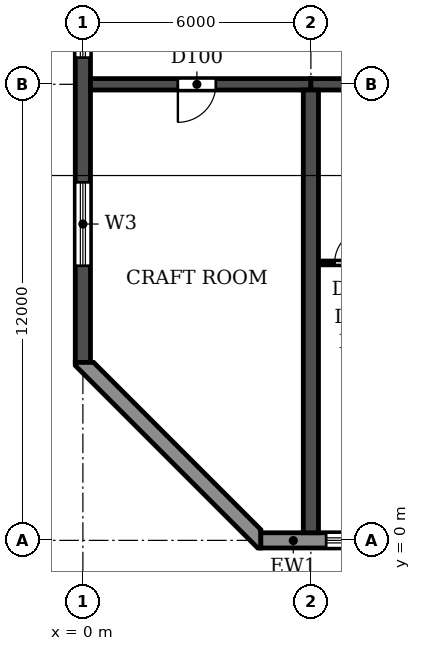
"""IFC4 building model, lengths in metres.
Left out: names, types, materials, properties, quantities, classifications, styles, units other than length and angle.
Written with IfcOpenShell. Run it as: python <this file> out.ifc"""

import sys

from ifc_helpers import new_model, si_unit, direction, frame, frame_2d, origin, place, context, subcontext, project, spatial, polyline, rectangle, outline, extrude, element, fill, save


model = new_model("IFC4")
c1 = context("Model", 3, precision=1e-05, world=origin(), true_north=direction((0.0, 1.0)))
c2 = subcontext(c1, "Body", "Model", "MODEL_VIEW")
j1 = project(units=[si_unit("LENGTHUNIT", "METRE"), si_unit("PLANEANGLEUNIT", "RADIAN")], contexts=[c1])
p1 = place(None, origin())
s1 = spatial("IfcSite", under=j1, at=p1, CompositionType="ELEMENT")
p2 = place(p1, origin())
s2 = spatial("IfcBuilding", under=s1, at=p2, CompositionType="ELEMENT")
p3 = place(p2, frame((0.0, 0.0, 43.2)))
s3 = spatial("IfcBuildingStorey", under=s2, at=p3, CompositionType="ELEMENT", Elevation=43.2)
p4 = place(p3, frame((6.0, 0.2, 0.0), z_axis=(0.0, 0.0, 1.0), x_axis=(0.0, 1.0, 0.0)))
e1 = element("IfcWall", 1, at=p4, inside=s3, PredefinedType="SHEAR", context=c2, shape_type="SweptSolid", body=[
    extrude(rectangle(XDim=11.65, YDim=0.4, at=frame_2d((5.825, 0.0))), origin(), (0.0, 0.0, 1.0), 3.05),
])
p5 = place(p3, frame((0.0, 4.683, 0.0), z_axis=(0.0, 0.0, 1.0), x_axis=(0.0, 1.0, 0.0)))
e2 = element("IfcWall", 2, at=p5, inside=s3, PredefinedType="SHEAR", context=c2, shape_type="SweptSolid", body=[
    extrude(rectangle(XDim=35.434, YDim=0.4, at=frame_2d((17.717, 0.0))), origin(), (0.0, 0.0, 1.0), 3.05),
])
p6 = place(p5, frame((23.817, 0.0, 0.9)))
e3 = element("IfcOpeningElement", 3, at=p6, cuts=e2, PredefinedType="OPENING", context=c2, shape_type="SweptSolid", body=[
    extrude(rectangle(XDim=1.2, YDim=1.5, at=frame_2d((0.6, 0.75))), frame((0.0, 0.21, 0.0), z_axis=(0.0, -1.0, 0.0), x_axis=(1.0, 0.0, 0.0)), (0.0, 0.0, 1.0), 0.42),
])
p7 = place(p5, frame((8.017, 0.0, 0.9)))
e4 = element("IfcOpeningElement", 4, at=p7, cuts=e2, PredefinedType="OPENING", context=c2, shape_type="SweptSolid", body=[
    extrude(rectangle(XDim=1.2, YDim=1.5, at=frame_2d((0.6, 0.75))), frame((0.0, 0.21, 0.0), z_axis=(0.0, -1.0, 0.0), x_axis=(1.0, 0.0, 0.0)), (0.0, 0.0, 1.0), 0.42),
])
p8 = place(p5, frame((15.917, 0.0, 0.9)))
e5 = element("IfcOpeningElement", 5, at=p8, cuts=e2, PredefinedType="OPENING", context=c2, shape_type="SweptSolid", body=[
    extrude(rectangle(XDim=1.2, YDim=1.5, at=frame_2d((0.6, 0.75))), frame((0.0, 0.21, 0.0), z_axis=(0.0, -1.0, 0.0), x_axis=(1.0, 0.0, 0.0)), (0.0, 0.0, 1.0), 0.42),
])
p9 = place(p5, frame((29.493, 0.0, 0.6)))
e6 = element("IfcOpeningElement", 6, at=p9, cuts=e2, PredefinedType="OPENING", context=c2, shape_type="SweptSolid", body=[
    extrude(rectangle(XDim=2.2, YDim=1.8, at=frame_2d((1.1, 0.9))), frame((0.0, 0.21, 0.0), z_axis=(0.0, -1.0, 0.0), x_axis=(1.0, 0.0, 0.0)), (0.0, 0.0, 1.0), 0.42),
])
p10 = place(p5, frame((2.541, 0.0, 0.6)))
e7 = element("IfcOpeningElement", 7, at=p10, cuts=e2, PredefinedType="OPENING", context=c2, shape_type="SweptSolid", body=[
    extrude(rectangle(XDim=2.2, YDim=1.8, at=frame_2d((1.1, 0.9))), frame((0.0, 0.21, 0.0), z_axis=(0.0, -1.0, 0.0), x_axis=(1.0, 0.0, 0.0)), (0.0, 0.0, 1.0), 0.42),
])
p11 = place(p3, frame((0.2, 12.0, 0.0), z_axis=(0.0, 0.0, 1.0), x_axis=(1.0, 0.0, 0.0)))
e8 = element("IfcWall", 8, at=p11, inside=s3, PredefinedType="SHEAR", context=c2, shape_type="SweptSolid", body=[
    extrude(rectangle(XDim=5.8, YDim=0.3, at=frame_2d((2.9, 0.0))), origin(), (0.0, 0.0, 1.0), 2.45),
])
p12 = place(p11, frame((2.3, 0.0, 0.0)))
e9 = element("IfcOpeningElement", 9, at=p12, cuts=e8, PredefinedType="OPENING", context=c2, shape_type="SweptSolid", body=[
    extrude(rectangle(XDim=1.0, YDim=2.1, at=frame_2d((0.5, 1.05))), frame((0.0, 0.16, 0.0), z_axis=(0.0, -1.0, 0.0), x_axis=(1.0, 0.0, 0.0)), (0.0, 0.0, 1.0), 0.32),
])
p13 = place(p3, frame((6.0, 12.0, 0.0), z_axis=(0.0, 0.0, 1.0), x_axis=(1.0, 0.0, 0.0)))
e10 = element("IfcWall", 10, at=p13, inside=s3, PredefinedType="SHEAR", context=c2, shape_type="SweptSolid", body=[
    extrude(rectangle(XDim=6.0, YDim=0.3, at=frame_2d((3.0, 0.0))), origin(), (0.0, 0.0, 1.0), 2.45),
])
p14 = place(p13, frame((2.55, 0.0, 0.0)))
e11 = element("IfcOpeningElement", 11, at=p14, cuts=e10, PredefinedType="OPENING", context=c2, shape_type="SweptSolid", body=[
    extrude(rectangle(XDim=1.0, YDim=2.1, at=frame_2d((0.5, 1.05))), frame((0.0, 0.16, 0.0), z_axis=(0.0, -1.0, 0.0), x_axis=(1.0, 0.0, 0.0)), (0.0, 0.0, 1.0), 0.32),
])
p15 = place(p3, frame((4.683, 0.0, 0.0), z_axis=(0.0, 0.0, 1.0), x_axis=(1.0, 0.0, 0.0)))
e12 = element("IfcWall", 12, at=p15, inside=s3, PredefinedType="STANDARD", context=c2, shape_type="SweptSolid", body=[
    extrude(rectangle(XDim=92.634, YDim=0.4, at=frame_2d((46.317, 0.0))), origin(), (0.0, 0.0, 1.0), 3.05),
])
p16 = place(p15, frame((1.717, 0.0, 0.9)))
e13 = element("IfcOpeningElement", 13, at=p16, cuts=e12, PredefinedType="OPENING", context=c2, shape_type="SweptSolid", body=[
    extrude(rectangle(XDim=2.2, YDim=1.5, at=frame_2d((1.1, 0.75))), frame((0.0, 0.21, 0.0), z_axis=(0.0, -1.0, 0.0), x_axis=(1.0, 0.0, 0.0)), (0.0, 0.0, 1.0), 0.42),
])
p17 = place(p15, frame((4.717, 0.0, 0.9)))
e14 = element("IfcOpeningElement", 14, at=p17, cuts=e12, PredefinedType="OPENING", context=c2, shape_type="SweptSolid", body=[
    extrude(rectangle(XDim=2.2, YDim=1.5, at=frame_2d((1.1, 0.75))), frame((0.0, 0.21, 0.0), z_axis=(0.0, -1.0, 0.0), x_axis=(1.0, 0.0, 0.0)), (0.0, 0.0, 1.0), 0.42),
])
p18 = place(p15, frame((7.717, 0.0, 0.9)))
e15 = element("IfcOpeningElement", 15, at=p18, cuts=e12, PredefinedType="OPENING", context=c2, shape_type="SweptSolid", body=[
    extrude(rectangle(XDim=2.2, YDim=1.5, at=frame_2d((1.1, 0.75))), frame((0.0, 0.21, 0.0), z_axis=(0.0, -1.0, 0.0), x_axis=(1.0, 0.0, 0.0)), (0.0, 0.0, 1.0), 0.42),
])
p19 = place(p15, frame((10.917, 0.0, 0.0)))
e16 = element("IfcOpeningElement", 16, at=p19, cuts=e12, PredefinedType="OPENING", context=c2, shape_type="SweptSolid", body=[
    extrude(rectangle(XDim=1.8, YDim=2.4, at=frame_2d((0.9, 1.2))), frame((0.0, 0.21, 0.0), z_axis=(0.0, -1.0, 0.0), x_axis=(1.0, 0.0, 0.0)), (0.0, 0.0, 1.0), 0.42),
])
p20 = place(p15, frame((13.717, 0.0, 0.9)))
e17 = element("IfcOpeningElement", 17, at=p20, cuts=e12, PredefinedType="OPENING", context=c2, shape_type="SweptSolid", body=[
    extrude(rectangle(XDim=2.2, YDim=1.5, at=frame_2d((1.1, 0.75))), frame((0.0, 0.21, 0.0), z_axis=(0.0, -1.0, 0.0), x_axis=(1.0, 0.0, 0.0)), (0.0, 0.0, 1.0), 0.42),
])
p21 = place(p15, frame((16.717, 0.0, 0.9)))
e18 = element("IfcOpeningElement", 18, at=p21, cuts=e12, PredefinedType="OPENING", context=c2, shape_type="SweptSolid", body=[
    extrude(rectangle(XDim=2.2, YDim=1.5, at=frame_2d((1.1, 0.75))), frame((0.0, 0.21, 0.0), z_axis=(0.0, -1.0, 0.0), x_axis=(1.0, 0.0, 0.0)), (0.0, 0.0, 1.0), 0.42),
])
p22 = place(p15, frame((19.917, 0.0, 0.0)))
e19 = element("IfcOpeningElement", 19, at=p22, cuts=e12, PredefinedType="OPENING", context=c2, shape_type="SweptSolid", body=[
    extrude(rectangle(XDim=1.8, YDim=2.4, at=frame_2d((0.9, 1.2))), frame((0.0, 0.21, 0.0), z_axis=(0.0, -1.0, 0.0), x_axis=(1.0, 0.0, 0.0)), (0.0, 0.0, 1.0), 0.42),
])
p23 = place(p15, frame((22.717, 0.0, 0.9)))
e20 = element("IfcOpeningElement", 20, at=p23, cuts=e12, PredefinedType="OPENING", context=c2, shape_type="SweptSolid", body=[
    extrude(rectangle(XDim=2.2, YDim=1.5, at=frame_2d((1.1, 0.75))), frame((0.0, 0.21, 0.0), z_axis=(0.0, -1.0, 0.0), x_axis=(1.0, 0.0, 0.0)), (0.0, 0.0, 1.0), 0.42),
])
p24 = place(p15, frame((25.717, 0.0, 0.9)))
e21 = element("IfcOpeningElement", 21, at=p24, cuts=e12, PredefinedType="OPENING", context=c2, shape_type="SweptSolid", body=[
    extrude(rectangle(XDim=2.2, YDim=1.5, at=frame_2d((1.1, 0.75))), frame((0.0, 0.21, 0.0), z_axis=(0.0, -1.0, 0.0), x_axis=(1.0, 0.0, 0.0)), (0.0, 0.0, 1.0), 0.42),
])
p25 = place(p15, frame((28.717, 0.0, 0.9)))
e22 = element("IfcOpeningElement", 22, at=p25, cuts=e12, PredefinedType="OPENING", context=c2, shape_type="SweptSolid", body=[
    extrude(rectangle(XDim=2.2, YDim=1.5, at=frame_2d((1.1, 0.75))), frame((0.0, 0.21, 0.0), z_axis=(0.0, -1.0, 0.0), x_axis=(1.0, 0.0, 0.0)), (0.0, 0.0, 1.0), 0.42),
])
p26 = place(p15, frame((31.717, 0.0, 0.9)))
e23 = element("IfcOpeningElement", 23, at=p26, cuts=e12, PredefinedType="OPENING", context=c2, shape_type="SweptSolid", body=[
    extrude(rectangle(XDim=2.2, YDim=1.5, at=frame_2d((1.1, 0.75))), frame((0.0, 0.21, 0.0), z_axis=(0.0, -1.0, 0.0), x_axis=(1.0, 0.0, 0.0)), (0.0, 0.0, 1.0), 0.42),
])
p27 = place(p15, frame((34.917, 0.0, 0.0)))
e24 = element("IfcOpeningElement", 24, at=p27, cuts=e12, PredefinedType="OPENING", context=c2, shape_type="SweptSolid", body=[
    extrude(rectangle(XDim=1.8, YDim=2.4, at=frame_2d((0.9, 1.2))), frame((0.0, 0.21, 0.0), z_axis=(0.0, -1.0, 0.0), x_axis=(1.0, 0.0, 0.0)), (0.0, 0.0, 1.0), 0.42),
])
p28 = place(p15, frame((37.717, 0.0, 0.9)))
e25 = element("IfcOpeningElement", 25, at=p28, cuts=e12, PredefinedType="OPENING", context=c2, shape_type="SweptSolid", body=[
    extrude(rectangle(XDim=2.2, YDim=1.5, at=frame_2d((1.1, 0.75))), frame((0.0, 0.21, 0.0), z_axis=(0.0, -1.0, 0.0), x_axis=(1.0, 0.0, 0.0)), (0.0, 0.0, 1.0), 0.42),
])
p29 = place(p15, frame((40.717, 0.0, 0.9)))
e26 = element("IfcOpeningElement", 26, at=p29, cuts=e12, PredefinedType="OPENING", context=c2, shape_type="SweptSolid", body=[
    extrude(rectangle(XDim=2.2, YDim=1.5, at=frame_2d((1.1, 0.75))), frame((0.0, 0.21, 0.0), z_axis=(0.0, -1.0, 0.0), x_axis=(1.0, 0.0, 0.0)), (0.0, 0.0, 1.0), 0.42),
])
p30 = place(p15, frame((43.717, 0.0, 0.9)))
e27 = element("IfcOpeningElement", 27, at=p30, cuts=e12, PredefinedType="OPENING", context=c2, shape_type="SweptSolid", body=[
    extrude(rectangle(XDim=2.2, YDim=1.5, at=frame_2d((1.1, 0.75))), frame((0.0, 0.21, 0.0), z_axis=(0.0, -1.0, 0.0), x_axis=(1.0, 0.0, 0.0)), (0.0, 0.0, 1.0), 0.42),
])
p31 = place(p15, frame((46.917, 0.0, 0.0)))
e28 = element("IfcOpeningElement", 28, at=p31, cuts=e12, PredefinedType="OPENING", context=c2, shape_type="SweptSolid", body=[
    extrude(rectangle(XDim=1.8, YDim=2.4, at=frame_2d((0.9, 1.2))), frame((0.0, 0.21, 0.0), z_axis=(0.0, -1.0, 0.0), x_axis=(1.0, 0.0, 0.0)), (0.0, 0.0, 1.0), 0.42),
])
p32 = place(p15, frame((49.717, 0.0, 0.9)))
e29 = element("IfcOpeningElement", 29, at=p32, cuts=e12, PredefinedType="OPENING", context=c2, shape_type="SweptSolid", body=[
    extrude(rectangle(XDim=2.2, YDim=1.5, at=frame_2d((1.1, 0.75))), frame((0.0, 0.21, 0.0), z_axis=(0.0, -1.0, 0.0), x_axis=(1.0, 0.0, 0.0)), (0.0, 0.0, 1.0), 0.42),
])
p33 = place(p15, frame((52.717, 0.0, 0.9)))
e30 = element("IfcOpeningElement", 30, at=p33, cuts=e12, PredefinedType="OPENING", context=c2, shape_type="SweptSolid", body=[
    extrude(rectangle(XDim=2.2, YDim=1.5, at=frame_2d((1.1, 0.75))), frame((0.0, 0.21, 0.0), z_axis=(0.0, -1.0, 0.0), x_axis=(1.0, 0.0, 0.0)), (0.0, 0.0, 1.0), 0.42),
])
p34 = place(p15, frame((55.717, 0.0, 0.9)))
e31 = element("IfcOpeningElement", 31, at=p34, cuts=e12, PredefinedType="OPENING", context=c2, shape_type="SweptSolid", body=[
    extrude(rectangle(XDim=2.2, YDim=1.5, at=frame_2d((1.1, 0.75))), frame((0.0, 0.21, 0.0), z_axis=(0.0, -1.0, 0.0), x_axis=(1.0, 0.0, 0.0)), (0.0, 0.0, 1.0), 0.42),
])
p35 = place(p15, frame((58.917, 0.0, 0.0)))
e32 = element("IfcOpeningElement", 32, at=p35, cuts=e12, PredefinedType="OPENING", context=c2, shape_type="SweptSolid", body=[
    extrude(rectangle(XDim=1.8, YDim=2.4, at=frame_2d((0.9, 1.2))), frame((0.0, 0.21, 0.0), z_axis=(0.0, -1.0, 0.0), x_axis=(1.0, 0.0, 0.0)), (0.0, 0.0, 1.0), 0.42),
])
p36 = place(p15, frame((61.717, 0.0, 0.9)))
e33 = element("IfcOpeningElement", 33, at=p36, cuts=e12, PredefinedType="OPENING", context=c2, shape_type="SweptSolid", body=[
    extrude(rectangle(XDim=2.2, YDim=1.5, at=frame_2d((1.1, 0.75))), frame((0.0, 0.21, 0.0), z_axis=(0.0, -1.0, 0.0), x_axis=(1.0, 0.0, 0.0)), (0.0, 0.0, 1.0), 0.42),
])
p37 = place(p15, frame((64.717, 0.0, 0.9)))
e34 = element("IfcOpeningElement", 34, at=p37, cuts=e12, PredefinedType="OPENING", context=c2, shape_type="SweptSolid", body=[
    extrude(rectangle(XDim=2.2, YDim=1.5, at=frame_2d((1.1, 0.75))), frame((0.0, 0.21, 0.0), z_axis=(0.0, -1.0, 0.0), x_axis=(1.0, 0.0, 0.0)), (0.0, 0.0, 1.0), 0.42),
])
p38 = place(p15, frame((67.717, 0.0, 0.9)))
e35 = element("IfcOpeningElement", 35, at=p38, cuts=e12, PredefinedType="OPENING", context=c2, shape_type="SweptSolid", body=[
    extrude(rectangle(XDim=2.2, YDim=1.5, at=frame_2d((1.1, 0.75))), frame((0.0, 0.21, 0.0), z_axis=(0.0, -1.0, 0.0), x_axis=(1.0, 0.0, 0.0)), (0.0, 0.0, 1.0), 0.42),
])
p39 = place(p15, frame((70.917, 0.0, 0.0)))
e36 = element("IfcOpeningElement", 36, at=p39, cuts=e12, PredefinedType="OPENING", context=c2, shape_type="SweptSolid", body=[
    extrude(rectangle(XDim=1.8, YDim=2.4, at=frame_2d((0.9, 1.2))), frame((0.0, 0.21, 0.0), z_axis=(0.0, -1.0, 0.0), x_axis=(1.0, 0.0, 0.0)), (0.0, 0.0, 1.0), 0.42),
])
p40 = place(p15, frame((73.717, 0.0, 0.9)))
e37 = element("IfcOpeningElement", 37, at=p40, cuts=e12, PredefinedType="OPENING", context=c2, shape_type="SweptSolid", body=[
    extrude(rectangle(XDim=2.2, YDim=1.5, at=frame_2d((1.1, 0.75))), frame((0.0, 0.21, 0.0), z_axis=(0.0, -1.0, 0.0), x_axis=(1.0, 0.0, 0.0)), (0.0, 0.0, 1.0), 0.42),
])
p41 = place(p15, frame((76.717, 0.0, 0.9)))
e38 = element("IfcOpeningElement", 38, at=p41, cuts=e12, PredefinedType="OPENING", context=c2, shape_type="SweptSolid", body=[
    extrude(rectangle(XDim=2.2, YDim=1.5, at=frame_2d((1.1, 0.75))), frame((0.0, 0.21, 0.0), z_axis=(0.0, -1.0, 0.0), x_axis=(1.0, 0.0, 0.0)), (0.0, 0.0, 1.0), 0.42),
])
p42 = place(p15, frame((79.717, 0.0, 0.9)))
e39 = element("IfcOpeningElement", 39, at=p42, cuts=e12, PredefinedType="OPENING", context=c2, shape_type="SweptSolid", body=[
    extrude(rectangle(XDim=2.2, YDim=1.5, at=frame_2d((1.1, 0.75))), frame((0.0, 0.21, 0.0), z_axis=(0.0, -1.0, 0.0), x_axis=(1.0, 0.0, 0.0)), (0.0, 0.0, 1.0), 0.42),
])
p43 = place(p15, frame((82.917, 0.0, 0.0)))
e40 = element("IfcOpeningElement", 40, at=p43, cuts=e12, PredefinedType="OPENING", context=c2, shape_type="SweptSolid", body=[
    extrude(rectangle(XDim=1.8, YDim=2.4, at=frame_2d((0.9, 1.2))), frame((0.0, 0.21, 0.0), z_axis=(0.0, -1.0, 0.0), x_axis=(1.0, 0.0, 0.0)), (0.0, 0.0, 1.0), 0.42),
])
p44 = place(p15, frame((85.717, 0.0, 0.9)))
e41 = element("IfcOpeningElement", 41, at=p44, cuts=e12, PredefinedType="OPENING", context=c2, shape_type="SweptSolid", body=[
    extrude(rectangle(XDim=2.2, YDim=1.5, at=frame_2d((1.1, 0.75))), frame((0.0, 0.21, 0.0), z_axis=(0.0, -1.0, 0.0), x_axis=(1.0, 0.0, 0.0)), (0.0, 0.0, 1.0), 0.42),
])
p45 = place(p15, frame((88.717, 0.0, 0.9)))
e42 = element("IfcOpeningElement", 42, at=p45, cuts=e12, PredefinedType="OPENING", context=c2, shape_type="SweptSolid", body=[
    extrude(rectangle(XDim=2.2, YDim=1.5, at=frame_2d((1.1, 0.75))), frame((0.0, 0.21, 0.0), z_axis=(0.0, -1.0, 0.0), x_axis=(1.0, 0.0, 0.0)), (0.0, 0.0, 1.0), 0.42),
])
p46 = place(p3, origin())
e43 = element("IfcWall", 43, at=p46, inside=s3, PredefinedType="STANDARD", context=c2, shape_type="SweptSolid", body=[
    extrude(outline(polyline([(-0.2, 4.683), (-0.2, 4.6), (4.6, -0.2), (4.683, -0.2), (4.683, 0.283), (0.283, 4.683), (-0.2, 4.683)])), origin(), (0.0, 0.0, 1.0), 3.05),
])
p47 = place(p3, frame((6.21, 7.3, 0.0), z_axis=(0.0, 0.0, 1.0), x_axis=(1.0, 0.0, 0.0)))
e44 = element("IfcWall", 44, at=p47, inside=s3, PredefinedType="PARTITIONING", context=c2, shape_type="SweptSolid", body=[
    extrude(rectangle(XDim=1.99, YDim=0.1, at=frame_2d((0.995, 0.0))), origin(), (0.0, 0.0, 1.0), 3.05),
])
p48 = place(p47, frame((0.415, 0.0, 0.0)))
e45 = element("IfcOpeningElement", 45, at=p48, cuts=e44, PredefinedType="OPENING", context=c2, shape_type="SweptSolid", body=[
    extrude(rectangle(XDim=0.9, YDim=2.1, at=frame_2d((0.45, 1.05))), frame((0.0, 0.06, 0.0), z_axis=(0.0, -1.0, 0.0), x_axis=(1.0, 0.0, 0.0)), (0.0, 0.0, 1.0), 0.12),
])
p49 = place(p16, origin())
e46 = element("IfcWindow", 46, at=p49, inside=s3, PartitioningType="DOUBLE_PANEL_HORIZONTAL", PredefinedType="WINDOW", context=c2, shape_type="SweptSolid", body=[
    extrude(rectangle(XDim=2.2, YDim=1.5, at=frame_2d((1.1, 0.75))), frame((0.0, 0.03, 0.0), z_axis=(0.0, -1.0, 0.0), x_axis=(1.0, 0.0, 0.0)), (0.0, 0.0, 1.0), 0.06),
])
fill(e13, e46)
p50 = place(p7, origin())
e47 = element("IfcWindow", 47, at=p50, inside=s3, PartitioningType="SINGLE_PANEL", PredefinedType="WINDOW", context=c2, shape_type="SweptSolid", body=[
    extrude(rectangle(XDim=1.2, YDim=1.5, at=frame_2d((0.6, 0.75))), frame((0.0, 0.03, 0.0), z_axis=(0.0, -1.0, 0.0), x_axis=(1.0, 0.0, 0.0)), (0.0, 0.0, 1.0), 0.06),
])
fill(e4, e47)
p51 = place(p10, origin())
e48 = element("IfcWindow", 48, at=p51, inside=s3, PartitioningType="DOUBLE_PANEL_HORIZONTAL", PredefinedType="WINDOW", context=c2, shape_type="SweptSolid", body=[
    extrude(rectangle(XDim=2.2, YDim=1.8, at=frame_2d((1.1, 0.9))), frame((0.0, 0.03, 0.0), z_axis=(0.0, -1.0, 0.0), x_axis=(1.0, 0.0, 0.0)), (0.0, 0.0, 1.0), 0.06),
])
fill(e7, e48)
p52 = place(p12, frame((1.0, 0.0, 0.0), z_axis=(0.0, 0.0, 1.0), x_axis=(-1.0, 0.0, 0.0)))
e49 = element("IfcDoor", 49, at=p52, inside=s3, OperationType="SINGLE_SWING_RIGHT", PredefinedType="DOOR", context=c2, shape_type="SweptSolid", body=[
    extrude(rectangle(XDim=1.0, YDim=2.1, at=frame_2d((0.5, 1.05))), frame((0.0, 0.025, 0.0), z_axis=(0.0, -1.0, 0.0), x_axis=(1.0, 0.0, 0.0)), (0.0, 0.0, 1.0), 0.05),
])
fill(e9, e49)
p53 = place(p48, origin())
e50 = element("IfcDoor", 50, at=p53, inside=s3, OperationType="SINGLE_SWING_RIGHT", PredefinedType="DOOR", context=c2, shape_type="SweptSolid", body=[
    extrude(rectangle(XDim=0.9, YDim=2.1, at=frame_2d((0.45, 1.05))), frame((0.0, 0.025, 0.0), z_axis=(0.0, -1.0, 0.0), x_axis=(1.0, 0.0, 0.0)), (0.0, 0.0, 1.0), 0.05),
])
fill(e45, e50)
save(model, sys.argv[1])
